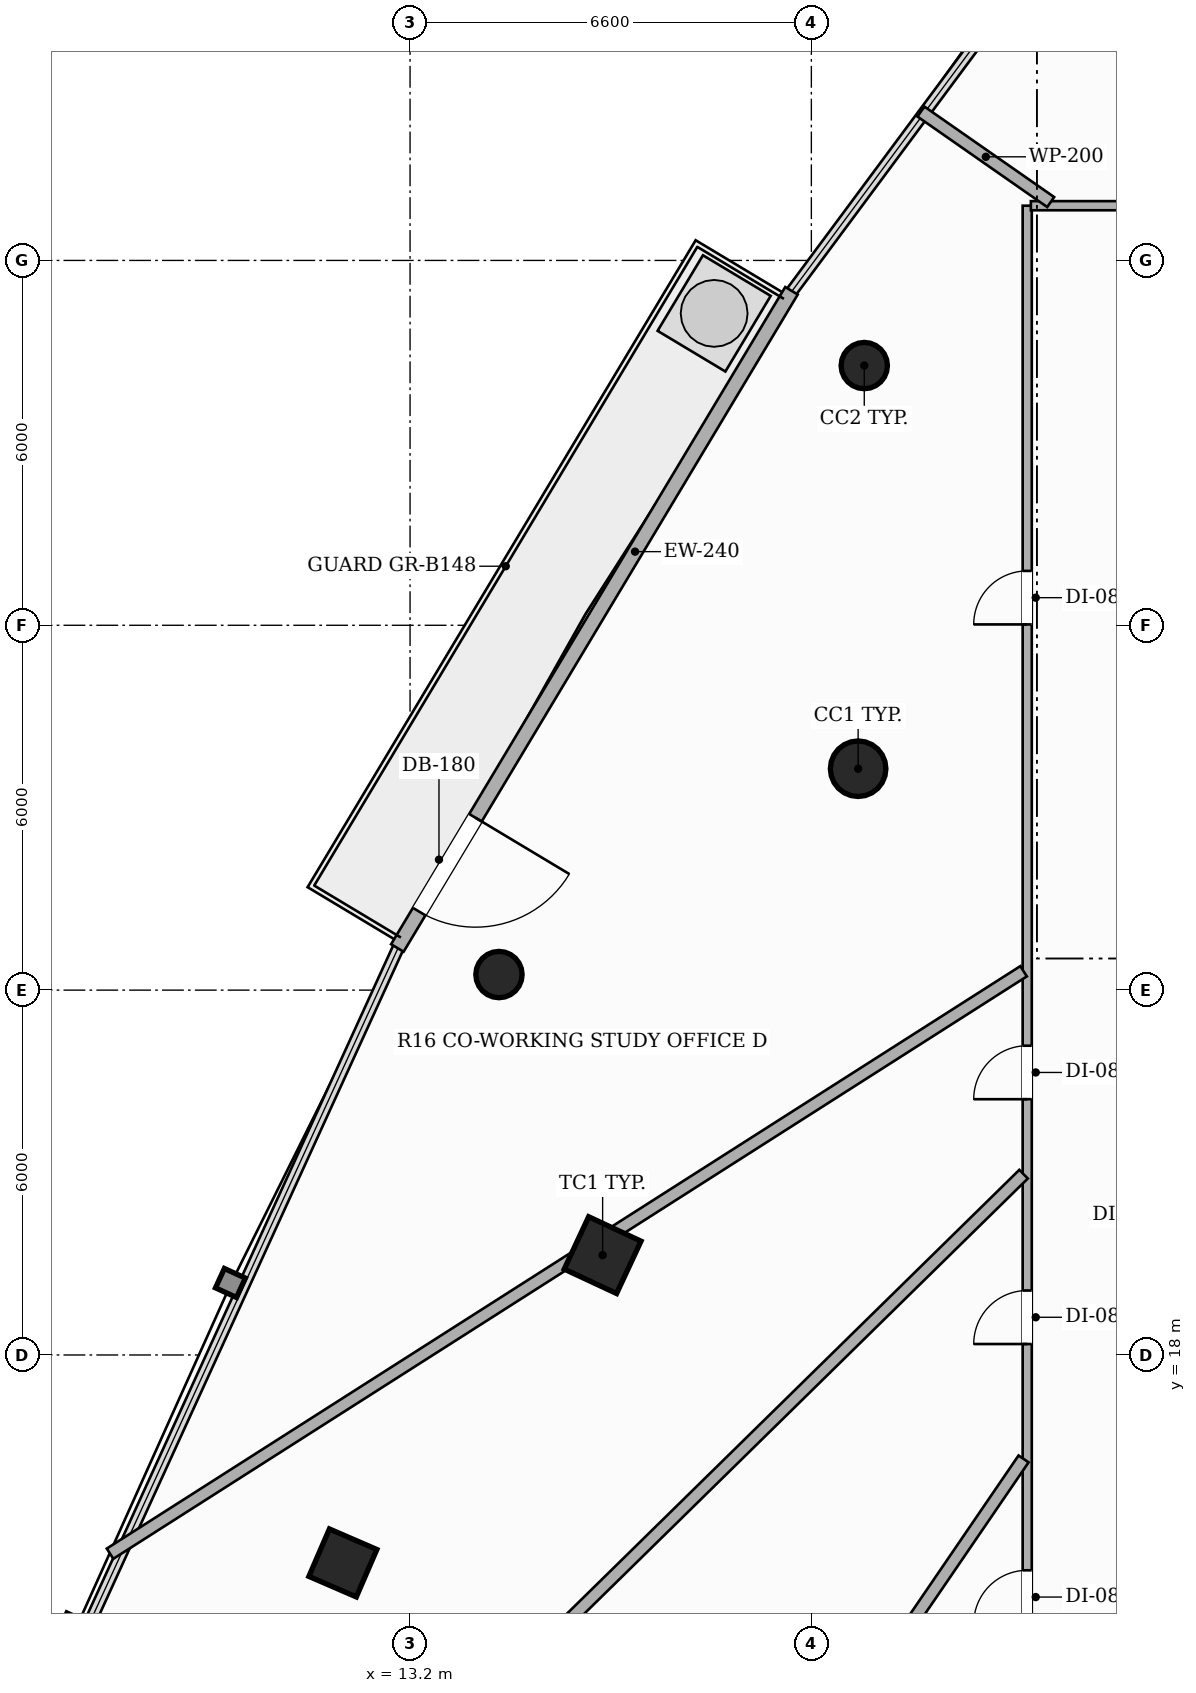
"""IFC4 building model, lengths in metres.
Left out: names, types, materials, properties, quantities, classifications, styles, units other than length and angle.
Written with IfcOpenShell. Run it as: python <this file> out.ifc"""

import sys

from ifc_helpers import new_model, si_unit, direction, frame, frame_2d, origin, origin_2d, place, context, subcontext, project, spatial, rectangle, hollow_rectangle, hollow_circle, extrude, element, fill, save


model = new_model("IFC4")
c1 = context("Model", 3, precision=1e-05, world=origin(), true_north=direction((0.0, 1.0)))
c2 = subcontext(c1, "Body", "Model", "MODEL_VIEW")
j1 = project(units=[si_unit("LENGTHUNIT", "METRE"), si_unit("PLANEANGLEUNIT", "RADIAN")], contexts=[c1])
p1 = place(None, origin())
s1 = spatial("IfcSite", under=j1, at=p1, CompositionType="ELEMENT")
p2 = place(p1, origin())
s2 = spatial("IfcBuilding", under=s1, at=p2, CompositionType="ELEMENT")
p3 = place(p2, frame((0.0, 0.0, 67.55)))
s3 = spatial("IfcBuildingStorey", under=s2, at=p3, CompositionType="ELEMENT", Elevation=67.55)
p4 = place(p3, frame((20.569, 27.641, 0.0), z_axis=(0.0, 0.0, 1.0), x_axis=(1.0, 0.0, 0.0)))
e1 = element("IfcColumn", 1, at=p4, inside=s3, PredefinedType="COLUMN", context=c2, shape_type="SweptSolid", body=[
    extrude(hollow_circle(Radius=0.457, WallThickness=0.025, at=origin_2d()), origin(), (0.0, 0.0, 1.0), 3.3),
])
p5 = place(p3, frame((16.367, 19.642, 0.0), z_axis=(0.0, 0.0, 1.0), x_axis=(0.422618261741, 0.906307787037, 0.0)))
e2 = element("IfcColumn", 2, at=p5, inside=s3, PredefinedType="COLUMN", context=c2, shape_type="SweptSolid", body=[
    extrude(hollow_rectangle(XDim=0.95, YDim=0.95, WallThickness=0.032, at=origin_2d()), origin(), (0.0, 0.0, 1.0), 3.3),
])
p6 = place(p3, frame((12.095, 14.58, 0.0), z_axis=(0.0, 0.0, 1.0), x_axis=(0.397147890635, 0.917754625684, 0.0)))
e3 = element("IfcColumn", 3, at=p6, inside=s3, PredefinedType="COLUMN", context=c2, shape_type="SweptSolid", body=[
    extrude(hollow_rectangle(XDim=0.85, YDim=0.85, WallThickness=0.028, at=origin_2d()), origin(), (0.0, 0.0, 1.0), 3.3),
])
for number, where, z_axis, x_axis in (
    (4, (20.67, 34.271, 0.0), (0.0, 0.0, 1.0), (1.0, 0.0, 0.0)),
    (5, (14.662, 24.256, 0.0), (0.0, 0.0, 1.0), (1.0, 0.0, 0.0)),
):
    element("IfcColumn", number, at=place(p3, frame(where, z_axis=z_axis, x_axis=x_axis)), inside=s3, PredefinedType="COLUMN", context=c2, shape_type="SweptSolid", body=[
        extrude(hollow_circle(Radius=0.381, WallThickness=0.022, at=origin_2d()), origin(), (0.0, 0.0, 1.0), 3.3),
    ])
p7 = place(p3, frame((19.473, 35.501, 0.0), z_axis=(0.0, 0.0, 1.0), x_axis=(-0.514333361126, -0.857590341382, 0.0)))
e6 = element("IfcWall", 6, at=p7, inside=s3, PredefinedType="SOLIDWALL", context=c2, shape_type="SweptSolid", body=[
    extrude(rectangle(XDim=12.603, YDim=0.24, at=frame_2d((6.301, 0.0))), origin(), (0.0, 0.0, 1.0), 2.624),
])
p8 = place(p7, frame((10.105, 0.0, 0.0)))
e7 = element("IfcOpeningElement", 7, at=p8, cuts=e6, PredefinedType="OPENING", context=c2, shape_type="SweptSolid", body=[
    extrude(rectangle(XDim=1.8, YDim=2.2, at=frame_2d((0.9, 1.1))), frame((0.0, 0.13, 0.0), z_axis=(0.0, -1.0, 0.0), x_axis=(1.0, 0.0, 0.0)), (0.0, 0.0, 1.0), 0.26),
])
p9 = place(p3, frame((23.35, 11.86, 0.0), z_axis=(0.0, 0.0, 1.0), x_axis=(0.0, 1.0, 0.0)))
e8 = element("IfcWall", 8, at=p9, inside=s3, PredefinedType="PARTITIONING", context=c2, shape_type="SweptSolid", body=[
    extrude(rectangle(XDim=25.04, YDim=0.15, at=frame_2d((12.52, 0.0))), origin(), (0.0, 0.0, 1.0), 2.413),
])
p10 = place(p9, frame((18.154, 0.0, 0.0)))
e9 = element("IfcOpeningElement", 9, at=p10, cuts=e8, PredefinedType="OPENING", context=c2, shape_type="SweptSolid", body=[
    extrude(rectangle(XDim=0.88, YDim=2.1, at=frame_2d((0.44, 1.05))), frame((0.0, 0.085, 0.0), z_axis=(0.0, -1.0, 0.0), x_axis=(1.0, 0.0, 0.0)), (0.0, 0.0, 1.0), 0.17),
])
p11 = place(p9, frame((10.346, 0.0, 0.0)))
e10 = element("IfcOpeningElement", 10, at=p11, cuts=e8, PredefinedType="OPENING", context=c2, shape_type="SweptSolid", body=[
    extrude(rectangle(XDim=0.88, YDim=2.1, at=frame_2d((0.44, 1.05))), frame((0.0, 0.085, 0.0), z_axis=(0.0, -1.0, 0.0), x_axis=(1.0, 0.0, 0.0)), (0.0, 0.0, 1.0), 0.17),
])
p12 = place(p9, frame((6.32, 0.0, 0.0)))
e11 = element("IfcOpeningElement", 11, at=p12, cuts=e8, PredefinedType="OPENING", context=c2, shape_type="SweptSolid", body=[
    extrude(rectangle(XDim=0.88, YDim=2.1, at=frame_2d((0.44, 1.05))), frame((0.0, 0.085, 0.0), z_axis=(0.0, -1.0, 0.0), x_axis=(1.0, 0.0, 0.0)), (0.0, 0.0, 1.0), 0.17),
])
p13 = place(p9, frame((1.719, 0.0, 0.0)))
e12 = element("IfcOpeningElement", 12, at=p13, cuts=e8, PredefinedType="OPENING", context=c2, shape_type="SweptSolid", body=[
    extrude(rectangle(XDim=0.88, YDim=2.1, at=frame_2d((0.44, 1.05))), frame((0.0, 0.085, 0.0), z_axis=(0.0, -1.0, 0.0), x_axis=(1.0, 0.0, 0.0)), (0.0, 0.0, 1.0), 0.17),
])
p14 = place(p3, frame((23.41, 36.9, 0.0), z_axis=(0.0, 0.0, 1.0), x_axis=(1.0, 0.0, 0.0)))
e13 = element("IfcWall", 13, at=p14, inside=s3, PredefinedType="PARTITIONING", context=c2, shape_type="SweptSolid", body=[
    extrude(rectangle(XDim=2.49, YDim=0.15, at=frame_2d((1.245, 0.0))), origin(), (0.0, 0.0, 1.0), 2.413),
])
p15 = place(p3, frame((23.736, 36.96, 0.0), z_axis=(0.0, 0.0, 1.0), x_axis=(-0.820275422115, 0.571968733302, 0.0)))
e14 = element("IfcWall", 14, at=p15, inside=s3, PredefinedType="PARTITIONING", context=c2, shape_type="SweptSolid", body=[
    extrude(rectangle(XDim=2.602, YDim=0.2, at=frame_2d((1.301, 0.0))), origin(), (0.0, 0.0, 1.0), 3.06),
])
p16 = place(p3, frame((23.29, 24.31, 0.0), z_axis=(0.0, 0.0, 1.0), x_axis=(-0.843217726059, -0.537572196509, 0.0)))
e15 = element("IfcWall", 15, at=p16, inside=s3, PredefinedType="PARTITIONING", context=c2, shape_type="SweptSolid", body=[
    extrude(rectangle(XDim=17.817, YDim=0.2, at=frame_2d((8.909, 0.0))), origin(), (0.0, 0.0, 1.0), 2.413),
])
p17 = place(p3, frame((23.29, 20.973, 0.0), z_axis=(0.0, 0.0, 1.0), x_axis=(-0.713831483248, -0.70031750908, 0.0)))
e16 = element("IfcWall", 16, at=p17, inside=s3, PredefinedType="PARTITIONING", context=c2, shape_type="SweptSolid", body=[
    extrude(rectangle(XDim=23.612, YDim=0.2, at=frame_2d((11.806, 0.0))), origin(), (0.0, 0.0, 1.0), 2.413),
])
p18 = place(p3, frame((23.29, 16.291, 0.0), z_axis=(0.0, 0.0, 1.0), x_axis=(-0.564210182678, -0.825631194761, 0.0)))
e17 = element("IfcWall", 17, at=p18, inside=s3, PredefinedType="PARTITIONING", context=c2, shape_type="SweptSolid", body=[
    extrude(rectangle(XDim=15.928, YDim=0.2, at=frame_2d((7.964, 0.0))), origin(), (0.0, 0.0, 1.0), 2.413),
])
p19 = place(p8, origin())
e18 = element("IfcDoor", 18, at=p19, inside=s3, OperationType="SINGLE_SWING_LEFT", PredefinedType="DOOR", context=c2, shape_type="SweptSolid", body=[
    extrude(rectangle(XDim=1.8, YDim=2.2, at=frame_2d((0.9, 1.1))), frame((0.0, 0.025, 0.0), z_axis=(0.0, -1.0, 0.0), x_axis=(1.0, 0.0, 0.0)), (0.0, 0.0, 1.0), 0.05),
])
fill(e7, e18)
p20 = place(p10, origin())
e19 = element("IfcDoor", 19, at=p20, inside=s3, OperationType="SINGLE_SWING_LEFT", PredefinedType="DOOR", context=c2, shape_type="SweptSolid", body=[
    extrude(rectangle(XDim=0.88, YDim=2.1, at=frame_2d((0.44, 1.05))), frame((0.0, 0.025, 0.0), z_axis=(0.0, -1.0, 0.0), x_axis=(1.0, 0.0, 0.0)), (0.0, 0.0, 1.0), 0.05),
])
fill(e9, e19)
p21 = place(p11, origin())
e20 = element("IfcDoor", 20, at=p21, inside=s3, OperationType="SINGLE_SWING_LEFT", PredefinedType="DOOR", context=c2, shape_type="SweptSolid", body=[
    extrude(rectangle(XDim=0.88, YDim=2.1, at=frame_2d((0.44, 1.05))), frame((0.0, 0.025, 0.0), z_axis=(0.0, -1.0, 0.0), x_axis=(1.0, 0.0, 0.0)), (0.0, 0.0, 1.0), 0.05),
])
fill(e10, e20)
p22 = place(p12, origin())
e21 = element("IfcDoor", 21, at=p22, inside=s3, OperationType="SINGLE_SWING_LEFT", PredefinedType="DOOR", context=c2, shape_type="SweptSolid", body=[
    extrude(rectangle(XDim=0.88, YDim=2.1, at=frame_2d((0.44, 1.05))), frame((0.0, 0.025, 0.0), z_axis=(0.0, -1.0, 0.0), x_axis=(1.0, 0.0, 0.0)), (0.0, 0.0, 1.0), 0.05),
])
fill(e11, e21)
p23 = place(p13, origin())
e22 = element("IfcDoor", 22, at=p23, inside=s3, OperationType="SINGLE_SWING_LEFT", PredefinedType="DOOR", context=c2, shape_type="SweptSolid", body=[
    extrude(rectangle(XDim=0.88, YDim=2.1, at=frame_2d((0.44, 1.05))), frame((0.0, 0.025, 0.0), z_axis=(0.0, -1.0, 0.0), x_axis=(1.0, 0.0, 0.0)), (0.0, 0.0, 1.0), 0.05),
])
fill(e12, e22)
save(model, sys.argv[1])
